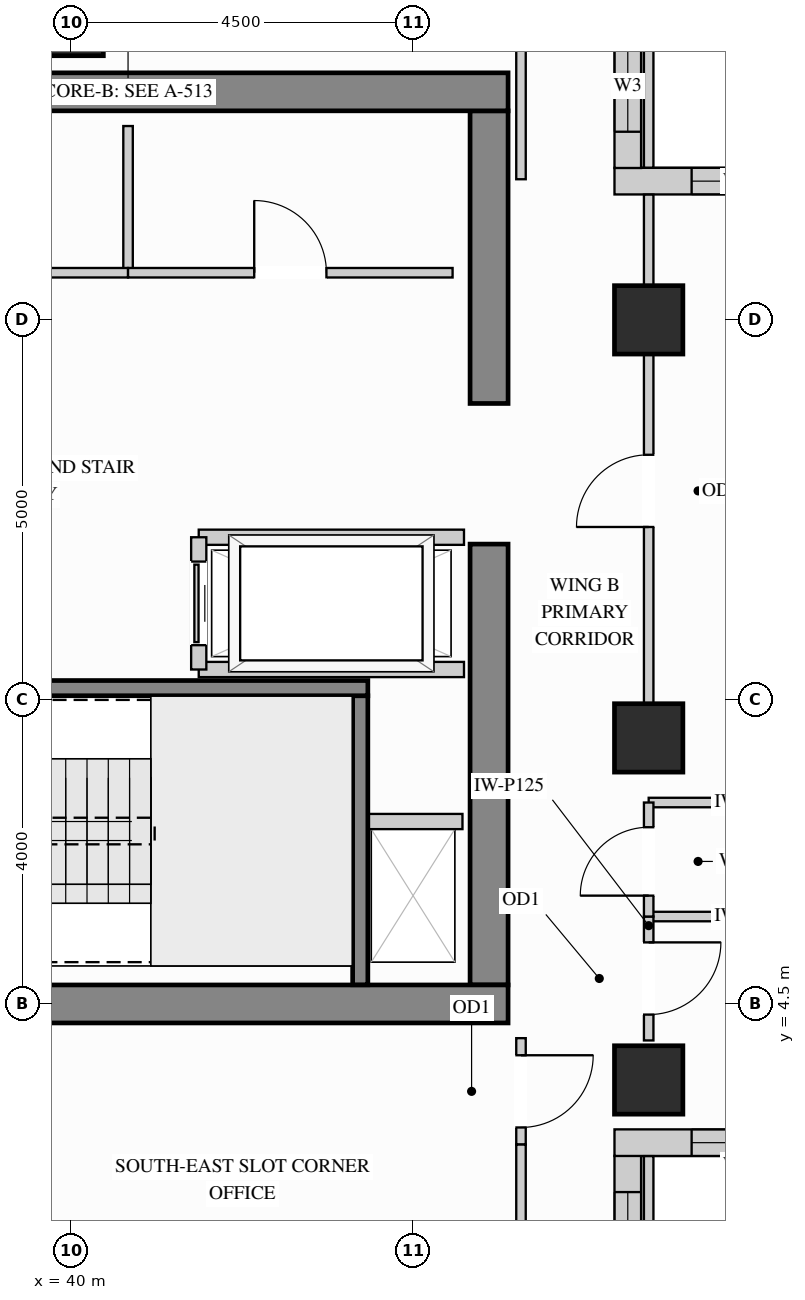
"""IFC4 building model, lengths in metres.
Left out: names, types, materials, properties, quantities, classifications, styles, units other than length and angle.
Written with IfcOpenShell. Run it as: python <this file> out.ifc"""

import sys

from ifc_helpers import new_model, si_unit, direction, frame, frame_2d, origin, origin_2d, place, context, subcontext, project, spatial, rectangle, extrude, source, transform, mapped, element, fill, save


model = new_model("IFC4")
c1 = context("Model", 3, precision=1e-05, world=origin(), true_north=direction((0.0, 1.0)))
c2 = subcontext(c1, "Body", "Model", "MODEL_VIEW")
j1 = project(units=[si_unit("LENGTHUNIT", "METRE"), si_unit("PLANEANGLEUNIT", "RADIAN")], contexts=[c1])
p1 = place(None, origin())
s1 = spatial("IfcSite", under=j1, at=p1, CompositionType="ELEMENT")
p2 = place(p1, origin())
s2 = spatial("IfcBuilding", under=s1, at=p2, CompositionType="ELEMENT")
p3 = place(p2, frame((0.0, 0.0, 226.8)))
s3 = spatial("IfcBuildingStorey", under=s2, at=p3, CompositionType="ELEMENT", Elevation=226.8)
m1 = source(origin(), c2, "Body", "SweptSolid", [
    extrude(rectangle(XDim=0.9, YDim=0.9, at=origin_2d()), origin(), (0.0, 0.0, 1.0), 3.4),
])
for number, where, z_axis, x_axis in (
    (1, (47.6, 13.5, 0.0), (0.0, 0.0, 1.0), (1.0, 0.0, 0.0)),
    (2, (47.6, 3.5, 0.0), (0.0, 0.0, 1.0), (1.0, 0.0, 0.0)),
    (3, (47.6, 8.0, 0.0), (0.0, 0.0, 1.0), (1.0, 0.0, 0.0)),
):
    element("IfcColumn", number, at=place(p3, frame(where, z_axis=z_axis, x_axis=x_axis)), inside=s3, PredefinedType="COLUMN", context=c2, shape_type="MappedRepresentation", body=[
        mapped(m1, transform((0.0, 0.0, 0.0), x_axis=(1.0, 0.0, 0.0), y_axis=(0.0, 1.0, 0.0), z_axis=(0.0, 0.0, 1.0))),
    ])
m2 = source(origin(), c2, "Body", "SweptSolid", [
    extrude(rectangle(XDim=0.85, YDim=0.85, at=origin_2d()), origin(), (0.0, 0.0, 1.0), 3.4),
])
p4 = place(p3, frame((40.0, 17.4, 0.0), z_axis=(0.0, 0.0, 1.0), x_axis=(1.0, 0.0, 0.0)))
e4 = element("IfcColumn", 4, at=p4, inside=s3, PredefinedType="COLUMN", context=c2, shape_type="MappedRepresentation", body=[
    mapped(m2, transform((0.0, 0.0, 0.0), x_axis=(1.0, 0.0, 0.0), y_axis=(0.0, 1.0, 0.0), z_axis=(0.0, 0.0, 1.0))),
])
m3 = source(origin(), c2, "Body", "SweptSolid", [
    extrude(rectangle(XDim=5.8, YDim=0.5, at=frame_2d((2.9, 0.0))), origin(), (0.0, 0.0, 1.0), 3.4),
])
p5 = place(p3, frame((45.5, 4.75, 0.0), z_axis=(0.0, 0.0, 1.0), x_axis=(0.0, 1.0, 0.0)))
e5 = element("IfcWall", 5, at=p5, inside=s3, PredefinedType="SHEAR", context=c2, shape_type="MappedRepresentation", body=[
    mapped(m3, transform((0.0, 0.0, 0.0), x_axis=(1.0, 0.0, 0.0), y_axis=(0.0, 1.0, 0.0), z_axis=(0.0, 0.0, 1.0))),
])
m4 = source(origin(), c2, "Body", "SweptSolid", [
    extrude(rectangle(XDim=3.85, YDim=0.5, at=frame_2d((1.925, 0.0))), origin(), (0.0, 0.0, 1.0), 3.4),
])
p6 = place(p3, frame((45.5, 12.4, 0.0), z_axis=(0.0, 0.0, 1.0), x_axis=(0.0, 1.0, 0.0)))
e6 = element("IfcWall", 6, at=p6, inside=s3, PredefinedType="SHEAR", context=c2, shape_type="MappedRepresentation", body=[
    mapped(m4, transform((0.0, 0.0, 0.0), x_axis=(1.0, 0.0, 0.0), y_axis=(0.0, 1.0, 0.0), z_axis=(0.0, 0.0, 1.0))),
])
m5 = source(origin(), c2, "Body", "SweptSolid", [
    extrude(rectangle(XDim=10.0, YDim=0.5, at=frame_2d((5.0, 0.0))), origin(), (0.0, 0.0, 1.0), 3.4),
])
for number, where, z_axis, x_axis in (
    (7, (35.75, 16.5, 0.0), (0.0, 0.0, 1.0), (1.0, 0.0, 0.0)),
    (8, (35.75, 4.5, 0.0), (0.0, 0.0, 1.0), (1.0, 0.0, 0.0)),
):
    element("IfcWall", number, at=place(p3, frame(where, z_axis=z_axis, x_axis=x_axis)), inside=s3, PredefinedType="SHEAR", context=c2, shape_type="MappedRepresentation", body=[
        mapped(m5, transform((0.0, 0.0, 0.0), x_axis=(1.0, 0.0, 0.0), y_axis=(0.0, 1.0, 0.0), z_axis=(0.0, 0.0, 1.0))),
    ])
p7 = place(p3, frame((47.325, 0.348, 0.0), z_axis=(0.0, 0.0, 1.0), x_axis=(0.0, 1.0, 0.0)))
e9 = element("IfcWall", 9, at=p7, inside=s3, PredefinedType="SOLIDWALL", context=c2, shape_type="SweptSolid", body=[
    extrude(rectangle(XDim=2.154, YDim=0.35, at=frame_2d((1.077, 0.0))), origin(), (0.0, 0.0, 1.0), 3.385),
])
p8 = place(p7, frame((0.477, 0.0, 0.78)))
e10 = element("IfcOpeningElement", 10, at=p8, cuts=e9, PredefinedType="OPENING", context=c2, shape_type="SweptSolid", body=[
    extrude(rectangle(XDim=1.2, YDim=2.1, at=frame_2d((0.6, 1.05))), frame((0.0, 0.185, 0.0), z_axis=(0.0, -1.0, 0.0), x_axis=(1.0, 0.0, 0.0)), (0.0, 0.0, 1.0), 0.37),
])
p9 = place(p3, frame((47.15, 2.675, 0.0), z_axis=(0.0, 0.0, 1.0), x_axis=(1.0, 0.0, 0.0)))
e11 = element("IfcWall", 11, at=p9, inside=s3, PredefinedType="SOLIDWALL", context=c2, shape_type="SweptSolid", body=[
    extrude(rectangle(XDim=2.85, YDim=0.35, at=frame_2d((1.425, 0.0))), origin(), (0.0, 0.0, 1.0), 3.385),
])
p10 = place(p9, frame((1.015, 0.0, 0.78)))
e12 = element("IfcOpeningElement", 12, at=p10, cuts=e11, PredefinedType="OPENING", context=c2, shape_type="SweptSolid", body=[
    extrude(rectangle(XDim=1.2, YDim=2.1, at=frame_2d((0.6, 1.05))), frame((0.0, 0.185, 0.0), z_axis=(0.0, -1.0, 0.0), x_axis=(1.0, 0.0, 0.0)), (0.0, 0.0, 1.0), 0.37),
])
p11 = place(p3, frame((50.0, 15.325, 0.0), z_axis=(0.0, 0.0, 1.0), x_axis=(-1.0, 0.0, 0.0)))
e13 = element("IfcWall", 13, at=p11, inside=s3, PredefinedType="SOLIDWALL", context=c2, shape_type="SweptSolid", body=[
    extrude(rectangle(XDim=2.85, YDim=0.35, at=frame_2d((1.425, 0.0))), origin(), (0.0, 0.0, 1.0), 3.385),
])
p12 = place(p11, frame((0.635, 0.0, 0.78)))
e14 = element("IfcOpeningElement", 14, at=p12, cuts=e13, PredefinedType="OPENING", context=c2, shape_type="SweptSolid", body=[
    extrude(rectangle(XDim=1.2, YDim=2.1, at=frame_2d((0.6, 1.05))), frame((0.0, 0.185, 0.0), z_axis=(0.0, -1.0, 0.0), x_axis=(1.0, 0.0, 0.0)), (0.0, 0.0, 1.0), 0.37),
])
p13 = place(p3, frame((47.325, 15.498, 0.0), z_axis=(0.0, 0.0, 1.0), x_axis=(0.0, 1.0, 0.0)))
e15 = element("IfcWall", 15, at=p13, inside=s3, PredefinedType="SOLIDWALL", context=c2, shape_type="SweptSolid", body=[
    extrude(rectangle(XDim=2.154, YDim=0.35, at=frame_2d((1.077, 0.0))), origin(), (0.0, 0.0, 1.0), 3.385),
])
p14 = place(p13, frame((0.477, 0.0, 0.78)))
e16 = element("IfcOpeningElement", 16, at=p14, cuts=e15, PredefinedType="OPENING", context=c2, shape_type="SweptSolid", body=[
    extrude(rectangle(XDim=1.2, YDim=2.1, at=frame_2d((0.6, 1.05))), frame((0.0, 0.185, 0.0), z_axis=(0.0, -1.0, 0.0), x_axis=(1.0, 0.0, 0.0)), (0.0, 0.0, 1.0), 0.37),
])
m6 = source(origin(), c2, "Body", "SweptSolid", [
    extrude(rectangle(XDim=1.93, YDim=0.125, at=frame_2d((0.965, 0.0))), origin(), (0.0, 0.0, 1.0), 3.385),
])
p15 = place(p3, frame((40.75, 14.12, 0.0), z_axis=(0.0, 0.0, 1.0), x_axis=(0.0, 1.0, 0.0)))
e17 = element("IfcWall", 17, at=p15, inside=s3, PredefinedType="PARTITIONING", context=c2, shape_type="MappedRepresentation", body=[
    mapped(m6, transform((0.0, 0.0, 0.0), x_axis=(1.0, 0.0, 0.0), y_axis=(0.0, 1.0, 0.0), z_axis=(0.0, 0.0, 1.0))),
])
p16 = place(p3, frame((36.5, 14.12, 0.0), z_axis=(0.0, 0.0, 1.0), x_axis=(1.0, 0.0, 0.0)))
e18 = element("IfcWall", 18, at=p16, inside=s3, PredefinedType="PARTITIONING", context=c2, shape_type="SweptSolid", body=[
    extrude(rectangle(XDim=4.25, YDim=0.125, at=frame_2d((2.125, 0.0))), origin(), (0.0, 0.0, 1.0), 3.385),
])
p17 = place(p16, frame((1.65, 0.0, 0.0)))
e19 = element("IfcOpeningElement", 19, at=p17, cuts=e18, PredefinedType="OPENING", context=c2, shape_type="SweptSolid", body=[
    extrude(rectangle(XDim=0.85, YDim=2.1, at=frame_2d((0.425, 1.05))), frame((0.0, 0.073, 0.0), z_axis=(0.0, -1.0, 0.0), x_axis=(1.0, 0.0, 0.0)), (0.0, 0.0, 1.0), 0.145),
])
p18 = place(p3, frame((40.75, 14.12, 0.0), z_axis=(0.0, 0.0, 1.0), x_axis=(1.0, 0.0, 0.0)))
e20 = element("IfcWall", 20, at=p18, inside=s3, PredefinedType="PARTITIONING", context=c2, shape_type="SweptSolid", body=[
    extrude(rectangle(XDim=4.27, YDim=0.125, at=frame_2d((2.135, 0.0))), origin(), (0.0, 0.0, 1.0), 3.385),
])
p19 = place(p18, frame((1.66, 0.0, 0.0)))
e21 = element("IfcOpeningElement", 21, at=p19, cuts=e20, PredefinedType="OPENING", context=c2, shape_type="SweptSolid", body=[
    extrude(rectangle(XDim=0.95, YDim=2.15, at=frame_2d((0.475, 1.075))), frame((0.0, 0.073, 0.0), z_axis=(0.0, -1.0, 0.0), x_axis=(1.0, 0.0, 0.0)), (0.0, 0.0, 1.0), 0.145),
])
m7 = source(origin(), c2, "Body", "SweptSolid", [
    extrude(rectangle(XDim=2.048, YDim=0.125, at=frame_2d((1.024, 0.0))), origin(), (0.0, 0.0, 1.0), 3.385),
])
for number, where, z_axis, x_axis in (
    (22, (47.6, 5.65, 0.0), (0.0, 0.0, 1.0), (1.0, 0.0, 0.0)),
    (23, (47.6, 7.15, 0.0), (0.0, 0.0, 1.0), (1.0, 0.0, 0.0)),
):
    element("IfcWall", number, at=place(p3, frame(where, z_axis=z_axis, x_axis=x_axis)), inside=s3, PredefinedType="PARTITIONING", context=c2, shape_type="MappedRepresentation", body=[
        mapped(m7, transform((0.0, 0.0, 0.0), x_axis=(1.0, 0.0, 0.0), y_axis=(0.0, 1.0, 0.0), z_axis=(0.0, 0.0, 1.0))),
    ])
p20 = place(p3, frame((47.6, 4.02, 0.0), z_axis=(0.0, 0.0, 1.0), x_axis=(0.0, 1.0, 0.0)))
e24 = element("IfcWall", 24, at=p20, inside=s3, PredefinedType="PARTITIONING", context=c2, shape_type="SweptSolid", body=[
    extrude(rectangle(XDim=1.63, YDim=0.125, at=frame_2d((0.815, 0.0))), origin(), (0.0, 0.0, 1.0), 2.773),
])
p21 = place(p20, frame((0.34, 0.0, 0.0)))
e25 = element("IfcOpeningElement", 25, at=p21, cuts=e24, PredefinedType="OPENING", context=c2, shape_type="SweptSolid", body=[
    extrude(rectangle(XDim=0.95, YDim=2.15, at=frame_2d((0.475, 1.075))), frame((0.0, 0.073, 0.0), z_axis=(0.0, -1.0, 0.0), x_axis=(1.0, 0.0, 0.0)), (0.0, 0.0, 1.0), 0.145),
])
m8 = source(origin(), c2, "Body", "SweptSolid", [
    extrude(rectangle(XDim=2.148, YDim=0.125, at=frame_2d((1.074, 0.0))), origin(), (0.0, 0.0, 1.0), 3.385),
])
p22 = place(p3, frame((47.6, 0.35, 0.0), z_axis=(0.0, 0.0, 1.0), x_axis=(0.0, 1.0, 0.0)))
e26 = element("IfcWall", 26, at=p22, inside=s3, PredefinedType="PARTITIONING", context=c2, shape_type="MappedRepresentation", body=[
    mapped(m8, transform((0.0, 0.0, 0.0), x_axis=(1.0, 0.0, 0.0), y_axis=(0.0, 1.0, 0.0), z_axis=(0.0, 0.0, 1.0))),
])
p23 = place(p3, frame((47.6, 8.45, 0.0), z_axis=(0.0, 0.0, 1.0), x_axis=(0.0, 1.0, 0.0)))
e27 = element("IfcWall", 27, at=p23, inside=s3, PredefinedType="PARTITIONING", context=c2, shape_type="SweptSolid", body=[
    extrude(rectangle(XDim=4.6, YDim=0.125, at=frame_2d((2.3, 0.0))), origin(), (0.0, 0.0, 1.0), 2.773),
])
p24 = place(p23, frame((2.325, 0.0, 0.0)))
e28 = element("IfcOpeningElement", 28, at=p24, cuts=e27, PredefinedType="OPENING", context=c2, shape_type="SweptSolid", body=[
    extrude(rectangle(XDim=0.95, YDim=2.15, at=frame_2d((0.475, 1.075))), frame((0.0, 0.073, 0.0), z_axis=(0.0, -1.0, 0.0), x_axis=(1.0, 0.0, 0.0)), (0.0, 0.0, 1.0), 0.145),
])
m9 = source(origin(), c2, "Body", "SweptSolid", [
    extrude(rectangle(XDim=1.198, YDim=0.125, at=frame_2d((0.599, 0.0))), origin(), (0.0, 0.0, 1.0), 3.385),
])
p25 = place(p3, frame((47.6, 13.95, 0.0), z_axis=(0.0, 0.0, 1.0), x_axis=(0.0, 1.0, 0.0)))
e29 = element("IfcWall", 29, at=p25, inside=s3, PredefinedType="PARTITIONING", context=c2, shape_type="MappedRepresentation", body=[
    mapped(m9, transform((0.0, 0.0, 0.0), x_axis=(1.0, 0.0, 0.0), y_axis=(0.0, 1.0, 0.0), z_axis=(0.0, 0.0, 1.0))),
])
p26 = place(p3, frame((47.6, 15.502, 0.0), z_axis=(0.0, 0.0, 1.0), x_axis=(0.0, 1.0, 0.0)))
e30 = element("IfcWall", 30, at=p26, inside=s3, PredefinedType="PARTITIONING", context=c2, shape_type="MappedRepresentation", body=[
    mapped(m8, transform((0.0, 0.0, 0.0), x_axis=(1.0, 0.0, 0.0), y_axis=(0.0, 1.0, 0.0), z_axis=(0.0, 0.0, 1.0))),
])
p27 = place(p3, frame((47.6, 5.65, 0.0), z_axis=(0.0, 0.0, 1.0), x_axis=(0.0, 1.0, 0.0)))
e31 = element("IfcWall", 31, at=p27, inside=s3, PredefinedType="PARTITIONING", context=c2, shape_type="SweptSolid", body=[
    extrude(rectangle(XDim=1.5, YDim=0.125, at=frame_2d((0.75, 0.0))), origin(), (0.0, 0.0, 1.0), 2.773),
])
p28 = place(p27, frame((0.275, 0.0, 0.0)))
e32 = element("IfcOpeningElement", 32, at=p28, cuts=e31, PredefinedType="OPENING", context=c2, shape_type="SweptSolid", body=[
    extrude(rectangle(XDim=0.9, YDim=2.15, at=frame_2d((0.45, 1.075))), frame((0.0, 0.073, 0.0), z_axis=(0.0, -1.0, 0.0), x_axis=(1.0, 0.0, 0.0)), (0.0, 0.0, 1.0), 0.145),
])
m10 = source(origin(), c2, "Body", "SweptSolid", [
    extrude(rectangle(XDim=2.298, YDim=0.125, at=frame_2d((1.149, 0.0))), origin(), (0.0, 0.0, 1.0), 3.385),
])
p29 = place(p3, frame((45.92, 15.35, 0.0), z_axis=(0.0, 0.0, 1.0), x_axis=(0.0, 1.0, 0.0)))
e33 = element("IfcWall", 33, at=p29, inside=s3, PredefinedType="PARTITIONING", context=c2, shape_type="MappedRepresentation", body=[
    mapped(m10, transform((0.0, 0.0, 0.0), x_axis=(1.0, 0.0, 0.0), y_axis=(0.0, 1.0, 0.0), z_axis=(0.0, 0.0, 1.0))),
])
p30 = place(p3, frame((45.92, 2.65, 0.0), z_axis=(0.0, 0.0, 1.0), x_axis=(0.0, 1.0, 0.0)))
e34 = element("IfcWall", 34, at=p30, inside=s3, PredefinedType="PARTITIONING", context=c2, shape_type="SweptSolid", body=[
    extrude(rectangle(XDim=1.4, YDim=0.125, at=frame_2d((0.7, 0.0))), origin(), (0.0, 0.0, 1.0), 3.385),
])
p31 = place(p30, frame((0.225, 0.0, 0.0)))
e35 = element("IfcOpeningElement", 35, at=p31, cuts=e34, PredefinedType="OPENING", context=c2, shape_type="SweptSolid", body=[
    extrude(rectangle(XDim=0.95, YDim=2.15, at=frame_2d((0.475, 1.075))), frame((0.0, 0.073, 0.0), z_axis=(0.0, -1.0, 0.0), x_axis=(1.0, 0.0, 0.0)), (0.0, 0.0, 1.0), 0.145),
])
p32 = place(p3, frame((45.92, 0.352, 0.0), z_axis=(0.0, 0.0, 1.0), x_axis=(0.0, 1.0, 0.0)))
e36 = element("IfcWall", 36, at=p32, inside=s3, PredefinedType="PARTITIONING", context=c2, shape_type="MappedRepresentation", body=[
    mapped(m10, transform((0.0, 0.0, 0.0), x_axis=(1.0, 0.0, 0.0), y_axis=(0.0, 1.0, 0.0), z_axis=(0.0, 0.0, 1.0))),
])
m11 = source(origin(), c2, "Body", "SweptSolid", [
    extrude(rectangle(XDim=1.3, YDim=0.2, at=frame_2d((0.65, 0.0))), origin(), (0.0, 0.0, 1.0), 3.385),
])
p33 = place(p3, frame((43.85, 6.9, 0.0), z_axis=(0.0, 0.0, 1.0), x_axis=(1.0, 0.0, 0.0)))
e37 = element("IfcWall", 37, at=p33, inside=s3, PredefinedType="PARTITIONING", context=c2, shape_type="MappedRepresentation", body=[
    mapped(m11, transform((0.0, 0.0, 0.0), x_axis=(1.0, 0.0, 0.0), y_axis=(0.0, 1.0, 0.0), z_axis=(0.0, 0.0, 1.0))),
])
m12 = source(origin(), c2, "Body", "SweptSolid", [
    extrude(rectangle(XDim=3.49, YDim=0.2, at=frame_2d((1.745, 0.0))), origin(), (0.0, 0.0, 1.0), 3.385),
])
for number, where, z_axis, x_axis in (
    (38, (41.68, 10.64, 0.0), (0.0, 0.0, 1.0), (1.0, 0.0, 0.0)),
    (39, (41.68, 8.9, 0.0), (0.0, 0.0, 1.0), (1.0, 0.0, 0.0)),
):
    element("IfcWall", number, at=place(p3, frame(where, z_axis=z_axis, x_axis=x_axis)), inside=s3, PredefinedType="PARTITIONING", context=c2, shape_type="MappedRepresentation", body=[
        mapped(m12, transform((0.0, 0.0, 0.0), x_axis=(1.0, 0.0, 0.0), y_axis=(0.0, 1.0, 0.0), z_axis=(0.0, 0.0, 1.0))),
    ])
p34 = place(p3, frame((41.68, 8.9, 0.0), z_axis=(0.0, 0.0, 1.0), x_axis=(0.0, 1.0, 0.0)))
e40 = element("IfcWall", 40, at=p34, inside=s3, PredefinedType="PARTITIONING", context=c2, shape_type="SweptSolid", body=[
    extrude(rectangle(XDim=1.74, YDim=0.2, at=frame_2d((0.87, 0.0))), origin(), (0.0, 0.0, 1.0), 3.385),
])
p35 = place(p34, frame((0.32, 0.0, 0.0)))
e41 = element("IfcOpeningElement", 41, at=p35, cuts=e40, PredefinedType="OPENING", context=c2, shape_type="SweptSolid", body=[
    extrude(rectangle(XDim=1.1, YDim=2.2, at=frame_2d((0.55, 1.1))), frame((0.0, 0.11, 0.0), z_axis=(0.0, -1.0, 0.0), x_axis=(1.0, 0.0, 0.0)), (0.0, 0.0, 1.0), 0.22),
])
m13 = source(origin(), c2, "Body", "SweptSolid", [
    extrude(rectangle(XDim=3.803, YDim=0.2, at=frame_2d((1.901, 0.0))), origin(), (0.0, 0.0, 1.0), 3.4),
])
p36 = place(p3, frame((43.805, 4.752, 0.0), z_axis=(0.0, 0.0, 1.0), x_axis=(0.0, 1.0, 0.0)))
e42 = element("IfcWall", 42, at=p36, inside=s3, PredefinedType="SHEAR", context=c2, shape_type="MappedRepresentation", body=[
    mapped(m13, transform((0.0, 0.0, 0.0), x_axis=(1.0, 0.0, 0.0), y_axis=(0.0, 1.0, 0.0), z_axis=(0.0, 0.0, 1.0))),
])
p37 = place(p3, frame((36.252, 8.655, 0.0), z_axis=(0.0, 0.0, 1.0), x_axis=(1.0, 0.0, 0.0)))
e43 = element("IfcWall", 43, at=p37, inside=s3, PredefinedType="SHEAR", context=c2, shape_type="SweptSolid", body=[
    extrude(rectangle(XDim=7.653, YDim=0.2, at=frame_2d((3.827, 0.0))), origin(), (0.0, 0.0, 1.0), 3.4),
])
p38 = place(p37, frame((0.35, 0.0, 0.0)))
e44 = element("IfcOpeningElement", 44, at=p38, cuts=e43, PredefinedType="OPENING", context=c2, shape_type="SweptSolid", body=[
    extrude(rectangle(XDim=1.1, YDim=2.15, at=frame_2d((0.55, 1.075))), frame((0.0, 0.11, 0.0), z_axis=(0.0, -1.0, 0.0), x_axis=(1.0, 0.0, 0.0)), (0.0, 0.0, 1.0), 0.22),
])
m14 = source(origin(), c2, "Body", "SweptSolid", [
    extrude(rectangle(XDim=1.1, YDim=2.2, at=frame_2d((0.55, 1.1))), frame((0.0, 0.025, 0.0), z_axis=(0.0, -1.0, 0.0), x_axis=(1.0, 0.0, 0.0)), (0.0, 0.0, 1.0), 0.05),
])
p39 = place(p35, origin())
e45 = element("IfcDoor", 45, at=p39, inside=s3, OperationType="SLIDING_TO_LEFT", PredefinedType="DOOR", context=c2, shape_type="MappedRepresentation", body=[
    mapped(m14, transform((0.0, 0.0, 0.0), x_axis=(1.0, 0.0, 0.0), y_axis=(0.0, 1.0, 0.0), z_axis=(0.0, 0.0, 1.0))),
])
fill(e41, e45)
m15 = source(origin(), c2, "Body", "SweptSolid", [
    extrude(rectangle(XDim=0.95, YDim=2.15, at=frame_2d((0.475, 1.075))), frame((0.0, 0.025, 0.0), z_axis=(0.0, -1.0, 0.0), x_axis=(1.0, 0.0, 0.0)), (0.0, 0.0, 1.0), 0.05),
])
p40 = place(p19, origin())
e46 = element("IfcDoor", 46, at=p40, inside=s3, OperationType="SINGLE_SWING_LEFT", PredefinedType="DOOR", context=c2, shape_type="MappedRepresentation", body=[
    mapped(m15, transform((0.0, 0.0, 0.0), x_axis=(1.0, 0.0, 0.0), y_axis=(0.0, 1.0, 0.0), z_axis=(0.0, 0.0, 1.0))),
])
fill(e21, e46)
p41 = place(p31, origin())
e47 = element("IfcDoor", 47, at=p41, inside=s3, OperationType="SINGLE_SWING_RIGHT", PredefinedType="DOOR", context=c2, shape_type="MappedRepresentation", body=[
    mapped(m15, transform((0.0, 0.0, 0.0), x_axis=(1.0, 0.0, 0.0), y_axis=(0.0, 1.0, 0.0), z_axis=(0.0, 0.0, 1.0))),
])
fill(e35, e47)
p42 = place(p21, origin())
e48 = element("IfcDoor", 48, at=p42, inside=s3, OperationType="SINGLE_SWING_RIGHT", PredefinedType="DOOR", context=c2, shape_type="MappedRepresentation", body=[
    mapped(m15, transform((0.0, 0.0, 0.0), x_axis=(1.0, 0.0, 0.0), y_axis=(0.0, 1.0, 0.0), z_axis=(0.0, 0.0, 1.0))),
])
fill(e25, e48)
p43 = place(p24, origin())
e49 = element("IfcDoor", 49, at=p43, inside=s3, OperationType="SINGLE_SWING_LEFT", PredefinedType="DOOR", context=c2, shape_type="MappedRepresentation", body=[
    mapped(m15, transform((0.0, 0.0, 0.0), x_axis=(1.0, 0.0, 0.0), y_axis=(0.0, 1.0, 0.0), z_axis=(0.0, 0.0, 1.0))),
])
fill(e28, e49)
m16 = source(origin(), c2, "Body", "SweptSolid", [
    extrude(rectangle(XDim=0.9, YDim=2.15, at=frame_2d((0.45, 1.075))), frame((0.0, 0.025, 0.0), z_axis=(0.0, -1.0, 0.0), x_axis=(1.0, 0.0, 0.0)), (0.0, 0.0, 1.0), 0.05),
])
p44 = place(p28, origin())
e50 = element("IfcDoor", 50, at=p44, inside=s3, OperationType="SINGLE_SWING_LEFT", PredefinedType="DOOR", context=c2, shape_type="MappedRepresentation", body=[
    mapped(m16, transform((0.0, 0.0, 0.0), x_axis=(1.0, 0.0, 0.0), y_axis=(0.0, 1.0, 0.0), z_axis=(0.0, 0.0, 1.0))),
])
fill(e32, e50)
m17 = source(origin(), c2, "Body", "SweptSolid", [
    extrude(rectangle(XDim=1.2, YDim=2.1, at=frame_2d((0.6, 1.05))), frame((0.0, 0.03, 0.0), z_axis=(0.0, -1.0, 0.0), x_axis=(1.0, 0.0, 0.0)), (0.0, 0.0, 1.0), 0.06),
])
p45 = place(p8, origin())
e51 = element("IfcWindow", 51, at=p45, inside=s3, PartitioningType="SINGLE_PANEL", PredefinedType="WINDOW", context=c2, shape_type="MappedRepresentation", body=[
    mapped(m17, transform((0.0, 0.0, 0.0), x_axis=(1.0, 0.0, 0.0), y_axis=(0.0, 1.0, 0.0), z_axis=(0.0, 0.0, 1.0))),
])
fill(e10, e51)
p46 = place(p10, origin())
e52 = element("IfcWindow", 52, at=p46, inside=s3, PartitioningType="SINGLE_PANEL", PredefinedType="WINDOW", context=c2, shape_type="MappedRepresentation", body=[
    mapped(m17, transform((0.0, 0.0, 0.0), x_axis=(1.0, 0.0, 0.0), y_axis=(0.0, 1.0, 0.0), z_axis=(0.0, 0.0, 1.0))),
])
fill(e12, e52)
p47 = place(p12, origin())
e53 = element("IfcWindow", 53, at=p47, inside=s3, PartitioningType="SINGLE_PANEL", PredefinedType="WINDOW", context=c2, shape_type="MappedRepresentation", body=[
    mapped(m17, transform((0.0, 0.0, 0.0), x_axis=(1.0, 0.0, 0.0), y_axis=(0.0, 1.0, 0.0), z_axis=(0.0, 0.0, 1.0))),
])
fill(e14, e53)
p48 = place(p14, origin())
e54 = element("IfcWindow", 54, at=p48, inside=s3, PartitioningType="SINGLE_PANEL", PredefinedType="WINDOW", context=c2, shape_type="MappedRepresentation", body=[
    mapped(m17, transform((0.0, 0.0, 0.0), x_axis=(1.0, 0.0, 0.0), y_axis=(0.0, 1.0, 0.0), z_axis=(0.0, 0.0, 1.0))),
])
fill(e16, e54)
save(model, sys.argv[1])
